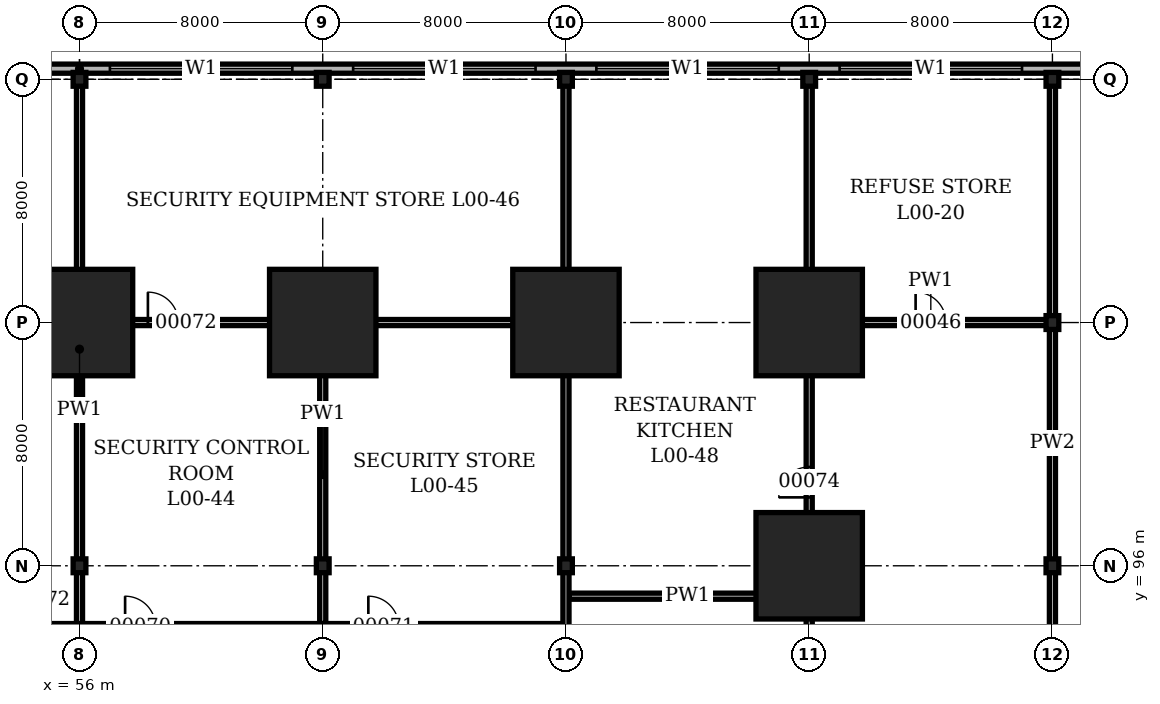
"""IFC4 building model, lengths in metres.
Left out: names, types, materials, properties, quantities, classifications, styles, units other than length and angle.
Written with IfcOpenShell. Run it as: python <this file> out.ifc"""

import sys

from ifc_helpers import new_model, si_unit, direction, frame, frame_2d, origin, origin_2d, place, context, subcontext, project, spatial, rectangle, hollow_rectangle, i_section, extrude, element, fill, save


model = new_model("IFC4")
c1 = context("Model", 3, precision=1e-05, world=origin(), true_north=direction((0.0, 1.0)))
c2 = subcontext(c1, "Body", "Model", "MODEL_VIEW")
j1 = project(units=[si_unit("LENGTHUNIT", "METRE"), si_unit("PLANEANGLEUNIT", "RADIAN")], contexts=[c1])
p1 = place(None, origin())
s1 = spatial("IfcSite", under=j1, at=p1, CompositionType="ELEMENT")
p2 = place(p1, origin())
s2 = spatial("IfcBuilding", under=s1, at=p2, CompositionType="ELEMENT")
p3 = place(p2, origin())
s3 = spatial("IfcBuildingStorey", under=s2, at=p3, CompositionType="ELEMENT", Elevation=0.0)
p4 = place(p3, frame((56.0, 96.0, 0.0), z_axis=(0.0, 0.0, 1.0), x_axis=(1.0, 0.0, 0.0)))
e1 = element("IfcColumn", 1, at=p4, inside=s3, PredefinedType="COLUMN", context=c2, shape_type="SweptSolid", body=[
    extrude(i_section(OverallWidth=0.419, OverallDepth=0.455, WebThickness=0.042, FlangeThickness=0.068, at=origin_2d()), origin(), (0.0, 0.0, 1.0), 4.9),
])
p5 = place(p3, frame((56.0, 104.0, 0.0), z_axis=(0.0, 0.0, 1.0), x_axis=(1.0, 0.0, 0.0)))
e2 = element("IfcColumn", 2, at=p5, inside=s3, PredefinedType="COLUMN", context=c2, shape_type="SweptSolid", body=[
    extrude(hollow_rectangle(XDim=3.5, YDim=3.5, WallThickness=0.5, at=origin_2d()), origin(), (0.0, 0.0, 1.0), 4.9),
])
for number, where, z_axis, x_axis in (
    (3, (56.0, 112.0, 0.0), (0.0, 0.0, 1.0), (1.0, 0.0, 0.0)),
    (4, (64.0, 96.0, 0.0), (0.0, 0.0, 1.0), (1.0, 0.0, 0.0)),
):
    element("IfcColumn", number, at=place(p3, frame(where, z_axis=z_axis, x_axis=x_axis)), inside=s3, PredefinedType="COLUMN", context=c2, shape_type="SweptSolid", body=[
        extrude(i_section(OverallWidth=0.419, OverallDepth=0.455, WebThickness=0.042, FlangeThickness=0.068, at=origin_2d()), origin(), (0.0, 0.0, 1.0), 4.9),
    ])
p6 = place(p3, frame((64.0, 104.0, 0.0), z_axis=(0.0, 0.0, 1.0), x_axis=(1.0, 0.0, 0.0)))
e5 = element("IfcColumn", 5, at=p6, inside=s3, PredefinedType="COLUMN", context=c2, shape_type="SweptSolid", body=[
    extrude(hollow_rectangle(XDim=3.5, YDim=3.5, WallThickness=0.5, at=origin_2d()), origin(), (0.0, 0.0, 1.0), 4.9),
])
for number, where, z_axis, x_axis in (
    (6, (64.0, 112.0, 0.0), (0.0, 0.0, 1.0), (1.0, 0.0, 0.0)),
    (7, (72.0, 96.0, 0.0), (0.0, 0.0, 1.0), (1.0, 0.0, 0.0)),
):
    element("IfcColumn", number, at=place(p3, frame(where, z_axis=z_axis, x_axis=x_axis)), inside=s3, PredefinedType="COLUMN", context=c2, shape_type="SweptSolid", body=[
        extrude(i_section(OverallWidth=0.419, OverallDepth=0.455, WebThickness=0.042, FlangeThickness=0.068, at=origin_2d()), origin(), (0.0, 0.0, 1.0), 4.9),
    ])
p7 = place(p3, frame((72.0, 104.0, 0.0), z_axis=(0.0, 0.0, 1.0), x_axis=(1.0, 0.0, 0.0)))
e8 = element("IfcColumn", 8, at=p7, inside=s3, PredefinedType="COLUMN", context=c2, shape_type="SweptSolid", body=[
    extrude(hollow_rectangle(XDim=3.5, YDim=3.5, WallThickness=0.5, at=origin_2d()), origin(), (0.0, 0.0, 1.0), 4.9),
])
p8 = place(p3, frame((72.0, 112.0, 0.0), z_axis=(0.0, 0.0, 1.0), x_axis=(1.0, 0.0, 0.0)))
e9 = element("IfcColumn", 9, at=p8, inside=s3, PredefinedType="COLUMN", context=c2, shape_type="SweptSolid", body=[
    extrude(i_section(OverallWidth=0.419, OverallDepth=0.455, WebThickness=0.042, FlangeThickness=0.068, at=origin_2d()), origin(), (0.0, 0.0, 1.0), 4.9),
])
for number, where, z_axis, x_axis in (
    (10, (80.0, 96.0, 0.0), (0.0, 0.0, 1.0), (1.0, 0.0, 0.0)),
    (11, (80.0, 104.0, 0.0), (0.0, 0.0, 1.0), (1.0, 0.0, 0.0)),
):
    element("IfcColumn", number, at=place(p3, frame(where, z_axis=z_axis, x_axis=x_axis)), inside=s3, PredefinedType="COLUMN", context=c2, shape_type="SweptSolid", body=[
        extrude(hollow_rectangle(XDim=3.5, YDim=3.5, WallThickness=0.5, at=origin_2d()), origin(), (0.0, 0.0, 1.0), 4.9),
    ])
for number, where, z_axis, x_axis in (
    (12, (80.0, 112.0, 0.0), (0.0, 0.0, 1.0), (1.0, 0.0, 0.0)),
    (13, (88.0, 96.0, 0.0), (0.0, 0.0, 1.0), (1.0, 0.0, 0.0)),
    (14, (88.0, 104.0, 0.0), (0.0, 0.0, 1.0), (1.0, 0.0, 0.0)),
    (15, (88.0, 112.0, 0.0), (0.0, 0.0, 1.0), (1.0, 0.0, 0.0)),
):
    element("IfcColumn", number, at=place(p3, frame(where, z_axis=z_axis, x_axis=x_axis)), inside=s3, PredefinedType="COLUMN", context=c2, shape_type="SweptSolid", body=[
        extrude(i_section(OverallWidth=0.419, OverallDepth=0.455, WebThickness=0.042, FlangeThickness=0.068, at=origin_2d()), origin(), (0.0, 0.0, 1.0), 4.9),
    ])
p9 = place(p3, frame((112.35, 112.35, 0.0), z_axis=(0.0, 0.0, 1.0), x_axis=(-1.0, 0.0, 0.0)))
e16 = element("IfcWall", 16, at=p9, inside=s3, PredefinedType="SOLIDWALL", context=c2, shape_type="SweptSolid", body=[
    extrude(rectangle(XDim=112.7, YDim=0.3, at=frame_2d((56.35, 0.0))), origin(), (0.0, 0.0, 1.0), 4.9),
])
p10 = place(p9, frame((1.35, 0.0, 1.2)))
e17 = element("IfcOpeningElement", 17, at=p10, cuts=e16, PredefinedType="OPENING", context=c2, shape_type="SweptSolid", body=[
    extrude(rectangle(XDim=6.0, YDim=1.5, at=frame_2d((3.0, 0.75))), frame((0.0, 0.16, 0.0), z_axis=(0.0, -1.0, 0.0), x_axis=(1.0, 0.0, 0.0)), (0.0, 0.0, 1.0), 0.32),
])
p11 = place(p9, frame((9.35, 0.0, 1.2)))
e18 = element("IfcOpeningElement", 18, at=p11, cuts=e16, PredefinedType="OPENING", context=c2, shape_type="SweptSolid", body=[
    extrude(rectangle(XDim=6.0, YDim=1.5, at=frame_2d((3.0, 0.75))), frame((0.0, 0.16, 0.0), z_axis=(0.0, -1.0, 0.0), x_axis=(1.0, 0.0, 0.0)), (0.0, 0.0, 1.0), 0.32),
])
p12 = place(p9, frame((17.35, 0.0, 1.2)))
e19 = element("IfcOpeningElement", 19, at=p12, cuts=e16, PredefinedType="OPENING", context=c2, shape_type="SweptSolid", body=[
    extrude(rectangle(XDim=6.0, YDim=1.5, at=frame_2d((3.0, 0.75))), frame((0.0, 0.16, 0.0), z_axis=(0.0, -1.0, 0.0), x_axis=(1.0, 0.0, 0.0)), (0.0, 0.0, 1.0), 0.32),
])
p13 = place(p9, frame((25.35, 0.0, 1.2)))
e20 = element("IfcOpeningElement", 20, at=p13, cuts=e16, PredefinedType="OPENING", context=c2, shape_type="SweptSolid", body=[
    extrude(rectangle(XDim=6.0, YDim=1.5, at=frame_2d((3.0, 0.75))), frame((0.0, 0.16, 0.0), z_axis=(0.0, -1.0, 0.0), x_axis=(1.0, 0.0, 0.0)), (0.0, 0.0, 1.0), 0.32),
])
p14 = place(p9, frame((33.35, 0.0, 1.2)))
e21 = element("IfcOpeningElement", 21, at=p14, cuts=e16, PredefinedType="OPENING", context=c2, shape_type="SweptSolid", body=[
    extrude(rectangle(XDim=6.0, YDim=1.5, at=frame_2d((3.0, 0.75))), frame((0.0, 0.16, 0.0), z_axis=(0.0, -1.0, 0.0), x_axis=(1.0, 0.0, 0.0)), (0.0, 0.0, 1.0), 0.32),
])
p15 = place(p9, frame((41.35, 0.0, 1.2)))
e22 = element("IfcOpeningElement", 22, at=p15, cuts=e16, PredefinedType="OPENING", context=c2, shape_type="SweptSolid", body=[
    extrude(rectangle(XDim=6.0, YDim=1.5, at=frame_2d((3.0, 0.75))), frame((0.0, 0.16, 0.0), z_axis=(0.0, -1.0, 0.0), x_axis=(1.0, 0.0, 0.0)), (0.0, 0.0, 1.0), 0.32),
])
p16 = place(p9, frame((49.35, 0.0, 1.2)))
e23 = element("IfcOpeningElement", 23, at=p16, cuts=e16, PredefinedType="OPENING", context=c2, shape_type="SweptSolid", body=[
    extrude(rectangle(XDim=6.0, YDim=1.5, at=frame_2d((3.0, 0.75))), frame((0.0, 0.16, 0.0), z_axis=(0.0, -1.0, 0.0), x_axis=(1.0, 0.0, 0.0)), (0.0, 0.0, 1.0), 0.32),
])
p17 = place(p9, frame((57.35, 0.0, 1.2)))
e24 = element("IfcOpeningElement", 24, at=p17, cuts=e16, PredefinedType="OPENING", context=c2, shape_type="SweptSolid", body=[
    extrude(rectangle(XDim=6.0, YDim=1.5, at=frame_2d((3.0, 0.75))), frame((0.0, 0.16, 0.0), z_axis=(0.0, -1.0, 0.0), x_axis=(1.0, 0.0, 0.0)), (0.0, 0.0, 1.0), 0.32),
])
p18 = place(p9, frame((65.35, 0.0, 1.2)))
e25 = element("IfcOpeningElement", 25, at=p18, cuts=e16, PredefinedType="OPENING", context=c2, shape_type="SweptSolid", body=[
    extrude(rectangle(XDim=6.0, YDim=1.5, at=frame_2d((3.0, 0.75))), frame((0.0, 0.16, 0.0), z_axis=(0.0, -1.0, 0.0), x_axis=(1.0, 0.0, 0.0)), (0.0, 0.0, 1.0), 0.32),
])
p19 = place(p9, frame((73.35, 0.0, 1.2)))
e26 = element("IfcOpeningElement", 26, at=p19, cuts=e16, PredefinedType="OPENING", context=c2, shape_type="SweptSolid", body=[
    extrude(rectangle(XDim=6.0, YDim=1.5, at=frame_2d((3.0, 0.75))), frame((0.0, 0.16, 0.0), z_axis=(0.0, -1.0, 0.0), x_axis=(1.0, 0.0, 0.0)), (0.0, 0.0, 1.0), 0.32),
])
p20 = place(p9, frame((81.35, 0.0, 1.2)))
e27 = element("IfcOpeningElement", 27, at=p20, cuts=e16, PredefinedType="OPENING", context=c2, shape_type="SweptSolid", body=[
    extrude(rectangle(XDim=6.0, YDim=1.5, at=frame_2d((3.0, 0.75))), frame((0.0, 0.16, 0.0), z_axis=(0.0, -1.0, 0.0), x_axis=(1.0, 0.0, 0.0)), (0.0, 0.0, 1.0), 0.32),
])
p21 = place(p9, frame((89.35, 0.0, 1.2)))
e28 = element("IfcOpeningElement", 28, at=p21, cuts=e16, PredefinedType="OPENING", context=c2, shape_type="SweptSolid", body=[
    extrude(rectangle(XDim=6.0, YDim=1.5, at=frame_2d((3.0, 0.75))), frame((0.0, 0.16, 0.0), z_axis=(0.0, -1.0, 0.0), x_axis=(1.0, 0.0, 0.0)), (0.0, 0.0, 1.0), 0.32),
])
p22 = place(p9, frame((97.35, 0.0, 1.2)))
e29 = element("IfcOpeningElement", 29, at=p22, cuts=e16, PredefinedType="OPENING", context=c2, shape_type="SweptSolid", body=[
    extrude(rectangle(XDim=6.0, YDim=1.5, at=frame_2d((3.0, 0.75))), frame((0.0, 0.16, 0.0), z_axis=(0.0, -1.0, 0.0), x_axis=(1.0, 0.0, 0.0)), (0.0, 0.0, 1.0), 0.32),
])
p23 = place(p9, frame((105.35, 0.0, 1.2)))
e30 = element("IfcOpeningElement", 30, at=p23, cuts=e16, PredefinedType="OPENING", context=c2, shape_type="SweptSolid", body=[
    extrude(rectangle(XDim=6.0, YDim=1.5, at=frame_2d((3.0, 0.75))), frame((0.0, 0.16, 0.0), z_axis=(0.0, -1.0, 0.0), x_axis=(1.0, 0.0, 0.0)), (0.0, 0.0, 1.0), 0.32),
])
p24 = place(p3, frame((72.1, 95.0, 0.0), z_axis=(0.0, 0.0, 1.0), x_axis=(1.0, 0.0, 0.0)))
e31 = element("IfcWall", 31, at=p24, inside=s3, PredefinedType="PARTITIONING", context=c2, shape_type="SweptSolid", body=[
    extrude(rectangle(XDim=7.8, YDim=0.2, at=frame_2d((3.9, 0.0))), origin(), (0.0, 0.0, 1.0), 4.7),
])
p25 = place(p3, frame((24.1, 104.0, 0.0), z_axis=(0.0, 0.0, 1.0), x_axis=(1.0, 0.0, 0.0)))
e32 = element("IfcWall", 32, at=p25, inside=s3, PredefinedType="PARTITIONING", context=c2, shape_type="SweptSolid", body=[
    extrude(rectangle(XDim=47.8, YDim=0.2, at=frame_2d((23.9, 0.0))), origin(), (0.0, 0.0, 1.0), 3.928),
])
p26 = place(p25, frame((18.0, 0.0, 0.0)))
e33 = element("IfcOpeningElement", 33, at=p26, cuts=e32, PredefinedType="OPENING", context=c2, shape_type="SweptSolid", body=[
    extrude(rectangle(XDim=1.8, YDim=2.4, at=frame_2d((0.9, 1.2))), frame((0.0, 0.11, 0.0), z_axis=(0.0, -1.0, 0.0), x_axis=(1.0, 0.0, 0.0)), (0.0, 0.0, 1.0), 0.22),
])
p27 = place(p25, frame((34.15, 0.0, 0.0)))
e34 = element("IfcOpeningElement", 34, at=p27, cuts=e32, PredefinedType="OPENING", context=c2, shape_type="SweptSolid", body=[
    extrude(rectangle(XDim=1.0, YDim=2.1, at=frame_2d((0.5, 1.05))), frame((0.0, 0.11, 0.0), z_axis=(0.0, -1.0, 0.0), x_axis=(1.0, 0.0, 0.0)), (0.0, 0.0, 1.0), 0.22),
])
p28 = place(p3, frame((80.1, 104.0, 0.0), z_axis=(0.0, 0.0, 1.0), x_axis=(1.0, 0.0, 0.0)))
e35 = element("IfcWall", 35, at=p28, inside=s3, PredefinedType="PARTITIONING", context=c2, shape_type="SweptSolid", body=[
    extrude(rectangle(XDim=7.8, YDim=0.2, at=frame_2d((3.9, 0.0))), origin(), (0.0, 0.0, 1.0), 3.928),
])
p29 = place(p28, frame((3.4, 0.0, 0.0)))
e36 = element("IfcOpeningElement", 36, at=p29, cuts=e35, PredefinedType="OPENING", context=c2, shape_type="SweptSolid", body=[
    extrude(rectangle(XDim=1.0, YDim=2.1, at=frame_2d((0.5, 1.05))), frame((0.0, 0.11, 0.0), z_axis=(0.0, -1.0, 0.0), x_axis=(1.0, 0.0, 0.0)), (0.0, 0.0, 1.0), 0.22),
])
p30 = place(p3, frame((56.0, 94.1, 0.0), z_axis=(0.0, 0.0, 1.0), x_axis=(0.0, 1.0, 0.0)))
e37 = element("IfcWall", 37, at=p30, inside=s3, PredefinedType="PARTITIONING", context=c2, shape_type="SweptSolid", body=[
    extrude(rectangle(XDim=18.05, YDim=0.2, at=frame_2d((9.025, 0.0))), origin(), (0.0, 0.0, 1.0), 3.928),
])
p31 = place(p3, frame((64.0, 94.1, 0.0), z_axis=(0.0, 0.0, 1.0), x_axis=(0.0, 1.0, 0.0)))
e38 = element("IfcWall", 38, at=p31, inside=s3, PredefinedType="PARTITIONING", context=c2, shape_type="SweptSolid", body=[
    extrude(rectangle(XDim=9.8, YDim=0.2, at=frame_2d((4.9, 0.0))), origin(), (0.0, 0.0, 1.0), 3.928),
])
p32 = place(p3, frame((72.0, 72.1, 0.0), z_axis=(0.0, 0.0, 1.0), x_axis=(0.0, 1.0, 0.0)))
e39 = element("IfcWall", 39, at=p32, inside=s3, PredefinedType="PARTITIONING", context=c2, shape_type="SweptSolid", body=[
    extrude(rectangle(XDim=40.05, YDim=0.2, at=frame_2d((20.025, 0.0))), origin(), (0.0, 0.0, 1.0), 3.928),
])
p33 = place(p32, frame((1.0, 0.0, 0.0)))
e40 = element("IfcOpeningElement", 40, at=p33, cuts=e39, PredefinedType="OPENING", context=c2, shape_type="SweptSolid", body=[
    extrude(rectangle(XDim=1.8, YDim=2.4, at=frame_2d((0.9, 1.2))), frame((0.0, 0.11, 0.0), z_axis=(0.0, -1.0, 0.0), x_axis=(1.0, 0.0, 0.0)), (0.0, 0.0, 1.0), 0.22),
])
p34 = place(p3, frame((80.0, 72.1, 0.0), z_axis=(0.0, 0.0, 1.0), x_axis=(0.0, 1.0, 0.0)))
e41 = element("IfcWall", 41, at=p34, inside=s3, PredefinedType="PARTITIONING", context=c2, shape_type="SweptSolid", body=[
    extrude(rectangle(XDim=40.05, YDim=0.2, at=frame_2d((20.025, 0.0))), origin(), (0.0, 0.0, 1.0), 3.928),
])
p35 = place(p34, frame((26.15, 0.0, 0.0)))
e42 = element("IfcOpeningElement", 42, at=p35, cuts=e41, PredefinedType="OPENING", context=c2, shape_type="SweptSolid", body=[
    extrude(rectangle(XDim=1.0, YDim=2.1, at=frame_2d((0.5, 1.05))), frame((0.0, 0.11, 0.0), z_axis=(0.0, -1.0, 0.0), x_axis=(1.0, 0.0, 0.0)), (0.0, 0.0, 1.0), 0.22),
])
p36 = place(p3, frame((88.0, 88.1, 0.0), z_axis=(0.0, 0.0, 1.0), x_axis=(0.0, 1.0, 0.0)))
e43 = element("IfcWall", 43, at=p36, inside=s3, PredefinedType="PARTITIONING", context=c2, shape_type="SweptSolid", body=[
    extrude(rectangle(XDim=23.9, YDim=0.2, at=frame_2d((11.95, 0.0))), origin(), (0.0, 0.0, 1.0), 3.928),
])
p37 = place(p36, frame((1.15, 0.0, 0.0)))
e44 = element("IfcOpeningElement", 44, at=p37, cuts=e43, PredefinedType="OPENING", context=c2, shape_type="SweptSolid", body=[
    extrude(rectangle(XDim=1.5, YDim=2.4, at=frame_2d((0.75, 1.2))), frame((0.0, 0.11, 0.0), z_axis=(0.0, -1.0, 0.0), x_axis=(1.0, 0.0, 0.0)), (0.0, 0.0, 1.0), 0.22),
])
p38 = place(p13, origin())
e45 = element("IfcWindow", 45, at=p38, inside=s3, PartitioningType="SINGLE_PANEL", PredefinedType="WINDOW", context=c2, shape_type="SweptSolid", body=[
    extrude(rectangle(XDim=6.0, YDim=1.5, at=frame_2d((3.0, 0.75))), frame((0.0, 0.03, 0.0), z_axis=(0.0, -1.0, 0.0), x_axis=(1.0, 0.0, 0.0)), (0.0, 0.0, 1.0), 0.06),
])
fill(e20, e45)
p39 = place(p14, origin())
e46 = element("IfcWindow", 46, at=p39, inside=s3, PartitioningType="SINGLE_PANEL", PredefinedType="WINDOW", context=c2, shape_type="SweptSolid", body=[
    extrude(rectangle(XDim=6.0, YDim=1.5, at=frame_2d((3.0, 0.75))), frame((0.0, 0.03, 0.0), z_axis=(0.0, -1.0, 0.0), x_axis=(1.0, 0.0, 0.0)), (0.0, 0.0, 1.0), 0.06),
])
fill(e21, e46)
p40 = place(p15, origin())
e47 = element("IfcWindow", 47, at=p40, inside=s3, PartitioningType="SINGLE_PANEL", PredefinedType="WINDOW", context=c2, shape_type="SweptSolid", body=[
    extrude(rectangle(XDim=6.0, YDim=1.5, at=frame_2d((3.0, 0.75))), frame((0.0, 0.03, 0.0), z_axis=(0.0, -1.0, 0.0), x_axis=(1.0, 0.0, 0.0)), (0.0, 0.0, 1.0), 0.06),
])
fill(e22, e47)
p41 = place(p16, origin())
e48 = element("IfcWindow", 48, at=p41, inside=s3, PartitioningType="SINGLE_PANEL", PredefinedType="WINDOW", context=c2, shape_type="SweptSolid", body=[
    extrude(rectangle(XDim=6.0, YDim=1.5, at=frame_2d((3.0, 0.75))), frame((0.0, 0.03, 0.0), z_axis=(0.0, -1.0, 0.0), x_axis=(1.0, 0.0, 0.0)), (0.0, 0.0, 1.0), 0.06),
])
fill(e23, e48)
p42 = place(p29, origin())
e49 = element("IfcDoor", 49, at=p42, inside=s3, OperationType="SINGLE_SWING_LEFT", PredefinedType="DOOR", context=c2, shape_type="SweptSolid", body=[
    extrude(rectangle(XDim=1.0, YDim=2.1, at=frame_2d((0.5, 1.05))), frame((0.0, 0.1, 0.0), z_axis=(0.0, -1.0, 0.0), x_axis=(1.0, 0.0, 0.0)), (0.0, 0.0, 1.0), 0.199),
])
fill(e36, e49)
p43 = place(p27, origin())
e50 = element("IfcDoor", 50, at=p43, inside=s3, OperationType="SINGLE_SWING_LEFT", PredefinedType="DOOR", context=c2, shape_type="SweptSolid", body=[
    extrude(rectangle(XDim=1.0, YDim=2.1, at=frame_2d((0.5, 1.05))), frame((0.0, 0.1, 0.0), z_axis=(0.0, -1.0, 0.0), x_axis=(1.0, 0.0, 0.0)), (0.0, 0.0, 1.0), 0.199),
])
fill(e34, e50)
p44 = place(p35, origin())
e51 = element("IfcDoor", 51, at=p44, inside=s3, OperationType="SINGLE_SWING_LEFT", PredefinedType="DOOR", context=c2, shape_type="SweptSolid", body=[
    extrude(rectangle(XDim=1.0, YDim=2.1, at=frame_2d((0.5, 1.05))), frame((0.0, 0.1, 0.0), z_axis=(0.0, -1.0, 0.0), x_axis=(1.0, 0.0, 0.0)), (0.0, 0.0, 1.0), 0.199),
])
fill(e42, e51)
save(model, sys.argv[1])
